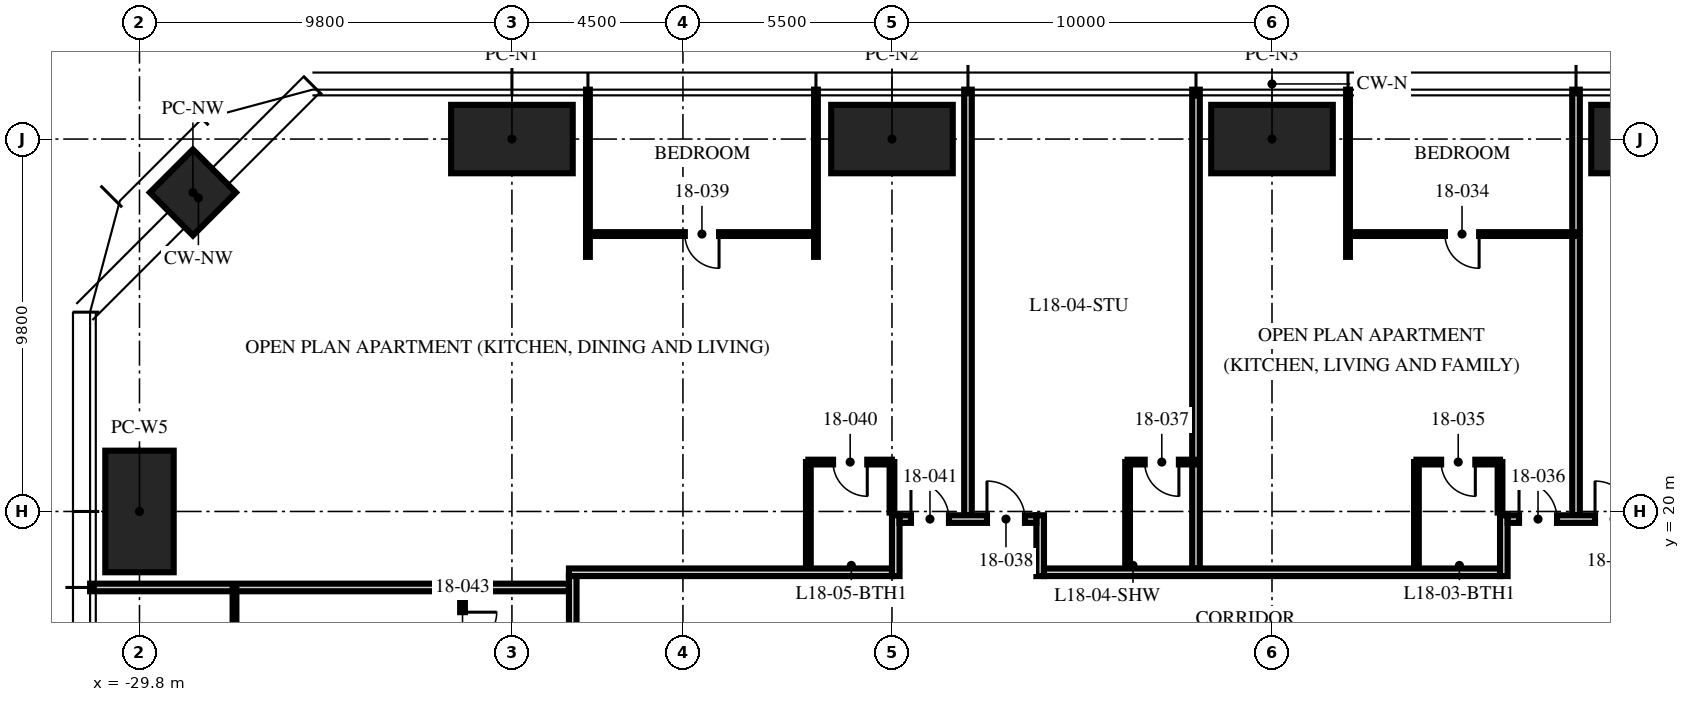
"""IFC4 building model, lengths in metres.
Left out: names, types, materials, properties, quantities, classifications, styles, units other than length and angle.
Written with IfcOpenShell. Run it as: python <this file> out.ifc"""

import sys

from ifc_helpers import new_model, si_unit, direction, frame, frame_2d, origin, origin_2d, place, context, subcontext, project, spatial, rectangle, hollow_rectangle, extrude, element, fill, save


model = new_model("IFC4")
c1 = context("Model", 3, precision=1e-05, world=origin(), true_north=direction((0.0, 1.0)))
c2 = subcontext(c1, "Body", "Model", "MODEL_VIEW")
j1 = project(units=[si_unit("LENGTHUNIT", "METRE"), si_unit("PLANEANGLEUNIT", "RADIAN")], contexts=[c1])
p1 = place(None, origin())
s1 = spatial("IfcSite", under=j1, at=p1, CompositionType="ELEMENT")
p2 = place(p1, origin())
s2 = spatial("IfcBuilding", under=s1, at=p2, CompositionType="ELEMENT")
p3 = place(p2, frame((0.0, 0.0, 73.5)))
s3 = spatial("IfcBuildingStorey", under=s2, at=p3, CompositionType="ELEMENT", Elevation=73.5)
for number, where, z_axis, x_axis in (
    (1, (-20.0, 29.8, 0.0), (0.0, 0.0, 1.0), (1.0, 0.0, 0.0)),
    (2, (-10.0, 29.8, 0.0), (0.0, 0.0, 1.0), (1.0, 0.0, 0.0)),
    (3, (0.0, 29.8, 0.0), (0.0, 0.0, 1.0), (1.0, 0.0, 0.0)),
    (4, (10.0, 29.8, 0.0), (0.0, 0.0, 1.0), (1.0, 0.0, 0.0)),
    (5, (-29.8, 20.0, 0.0), (0.0, 0.0, 1.0), (0.0, 1.0, 0.0)),
):
    element("IfcColumn", number, at=place(p3, frame(where, z_axis=z_axis, x_axis=x_axis)), inside=s3, PredefinedType="COLUMN", context=c2, shape_type="SweptSolid", body=[
        extrude(hollow_rectangle(XDim=3.2, YDim=1.8, WallThickness=0.2, at=origin_2d()), origin(), (0.0, 0.0, 1.0), 3.75),
    ])
p4 = place(p3, frame((-28.394, 28.394, 0.0), z_axis=(0.0, 0.0, 1.0), x_axis=(0.707106781187, 0.707106781187, 0.0)))
e6 = element("IfcColumn", 6, at=p4, inside=s3, PredefinedType="COLUMN", context=c2, shape_type="SweptSolid", body=[
    extrude(hollow_rectangle(XDim=1.6, YDim=1.6, WallThickness=0.1, at=origin_2d()), origin(), (0.0, 0.0, 1.0), 3.75),
])
p5 = place(p3, frame((8.0, 19.9, 0.0), z_axis=(0.0, 0.0, 1.0), x_axis=(0.0, 1.0, 0.0)))
e7 = element("IfcWall", 7, at=p5, inside=s3, PredefinedType="PARTITIONING", context=c2, shape_type="SweptSolid", body=[
    extrude(rectangle(XDim=11.2, YDim=0.2, at=frame_2d((5.6, 0.0))), origin(), (0.0, 0.0, 1.0), 2.71),
])
p6 = place(p3, frame((2.0, 26.7, 0.0), z_axis=(0.0, 0.0, 1.0), x_axis=(0.0, 1.0, 0.0)))
e8 = element("IfcWall", 8, at=p6, inside=s3, PredefinedType="PARTITIONING", context=c2, shape_type="SweptSolid", body=[
    extrude(rectangle(XDim=4.4, YDim=0.1, at=frame_2d((2.2, 0.0))), origin(), (0.0, 0.0, 1.0), 2.71),
])
p7 = place(p3, frame((-2.0, 18.5, 0.0), z_axis=(0.0, 0.0, 1.0), x_axis=(0.0, 1.0, 0.0)))
e9 = element("IfcWall", 9, at=p7, inside=s3, PredefinedType="PARTITIONING", context=c2, shape_type="SweptSolid", body=[
    extrude(rectangle(XDim=12.6, YDim=0.2, at=frame_2d((6.3, 0.0))), origin(), (0.0, 0.0, 1.0), 2.71),
])
p8 = place(p3, frame((-8.0, 19.9, 0.0), z_axis=(0.0, 0.0, 1.0), x_axis=(0.0, 1.0, 0.0)))
e10 = element("IfcWall", 10, at=p8, inside=s3, PredefinedType="PARTITIONING", context=c2, shape_type="SweptSolid", body=[
    extrude(rectangle(XDim=11.2, YDim=0.2, at=frame_2d((5.6, 0.0))), origin(), (0.0, 0.0, 1.0), 2.71),
])
for number, where, z_axis, x_axis in (
    (11, (-12.0, 26.7, 0.0), (0.0, 0.0, 1.0), (0.0, 1.0, 0.0)),
    (12, (-18.0, 26.7, 0.0), (0.0, 0.0, 1.0), (0.0, 1.0, 0.0)),
):
    element("IfcWall", number, at=place(p3, frame(where, z_axis=z_axis, x_axis=x_axis)), inside=s3, PredefinedType="PARTITIONING", context=c2, shape_type="SweptSolid", body=[
        extrude(rectangle(XDim=4.4, YDim=0.1, at=frame_2d((2.2, 0.0))), origin(), (0.0, 0.0, 1.0), 2.71),
    ])
p9 = place(p3, frame((-18.5, 18.0, 0.0), z_axis=(0.0, 0.0, 1.0), x_axis=(-1.0, 0.0, 0.0)))
e13 = element("IfcWall", 13, at=p9, inside=s3, PredefinedType="PARTITIONING", context=c2, shape_type="SweptSolid", body=[
    extrude(rectangle(XDim=12.6, YDim=0.2, at=frame_2d((6.3, 0.0))), origin(), (0.0, 0.0, 1.0), 2.3),
])
p10 = place(p3, frame((8.0, 27.3, 0.0), z_axis=(0.0, 0.0, 1.0), x_axis=(-1.0, 0.0, 0.0)))
e14 = element("IfcWall", 14, at=p10, inside=s3, PredefinedType="PARTITIONING", context=c2, shape_type="SweptSolid", body=[
    extrude(rectangle(XDim=6.0, YDim=0.1, at=frame_2d((3.0, 0.0))), origin(), (0.0, 0.0, 1.0), 2.61),
])
p11 = place(p10, frame((2.55, 0.0, 0.0)))
e15 = element("IfcOpeningElement", 15, at=p11, cuts=e14, PredefinedType="OPENING", context=c2, shape_type="SweptSolid", body=[
    extrude(rectangle(XDim=0.9, YDim=2.1, at=frame_2d((0.45, 1.05))), frame((0.0, 0.06, 0.0), z_axis=(0.0, -1.0, 0.0), x_axis=(1.0, 0.0, 0.0)), (0.0, 0.0, 1.0), 0.12),
])
p12 = place(p3, frame((6.0, 21.3, 0.0), z_axis=(0.0, 0.0, 1.0), x_axis=(-1.0, 0.0, 0.0)))
e16 = element("IfcWall", 16, at=p12, inside=s3, PredefinedType="PARTITIONING", context=c2, shape_type="SweptSolid", body=[
    extrude(rectangle(XDim=2.2, YDim=0.125, at=frame_2d((1.1, 0.0))), origin(), (0.0, 0.0, 1.0), 2.61),
])
p13 = place(p12, frame((0.65, 0.0, 0.0)))
e17 = element("IfcOpeningElement", 17, at=p13, cuts=e16, PredefinedType="OPENING", context=c2, shape_type="SweptSolid", body=[
    extrude(rectangle(XDim=0.9, YDim=2.1, at=frame_2d((0.45, 1.05))), frame((0.0, 0.073, 0.0), z_axis=(0.0, -1.0, 0.0), x_axis=(1.0, 0.0, 0.0)), (0.0, 0.0, 1.0), 0.145),
])
p14 = place(p3, frame((6.0, 19.97, 0.0), z_axis=(0.0, 0.0, 1.0), x_axis=(0.0, 1.0, 0.0)))
e18 = element("IfcWall", 18, at=p14, inside=s3, PredefinedType="PARTITIONING", context=c2, shape_type="SweptSolid", body=[
    extrude(rectangle(XDim=1.33, YDim=0.125, at=frame_2d((0.665, 0.0))), origin(), (0.0, 0.0, 1.0), 3.5),
])
p15 = place(p3, frame((3.8, 18.5, 0.0), z_axis=(0.0, 0.0, 1.0), x_axis=(0.0, 1.0, 0.0)))
e19 = element("IfcWall", 19, at=p15, inside=s3, PredefinedType="PARTITIONING", context=c2, shape_type="SweptSolid", body=[
    extrude(rectangle(XDim=2.8, YDim=0.125, at=frame_2d((1.4, 0.0))), origin(), (0.0, 0.0, 1.0), 3.5),
])
p16 = place(p3, frame((-2.0, 21.3, 0.0), z_axis=(0.0, 0.0, 1.0), x_axis=(-1.0, 0.0, 0.0)))
e20 = element("IfcWall", 20, at=p16, inside=s3, PredefinedType="PARTITIONING", context=c2, shape_type="SweptSolid", body=[
    extrude(rectangle(XDim=1.8, YDim=0.125, at=frame_2d((0.9, 0.0))), origin(), (0.0, 0.0, 1.0), 3.5),
])
p17 = place(p16, frame((0.45, 0.0, 0.0)))
e21 = element("IfcOpeningElement", 21, at=p17, cuts=e20, PredefinedType="OPENING", context=c2, shape_type="SweptSolid", body=[
    extrude(rectangle(XDim=0.9, YDim=2.1, at=frame_2d((0.45, 1.05))), frame((0.0, 0.073, 0.0), z_axis=(0.0, -1.0, 0.0), x_axis=(1.0, 0.0, 0.0)), (0.0, 0.0, 1.0), 0.145),
])
p18 = place(p3, frame((-3.8, 18.5, 0.0), z_axis=(0.0, 0.0, 1.0), x_axis=(0.0, 1.0, 0.0)))
e22 = element("IfcWall", 22, at=p18, inside=s3, PredefinedType="PARTITIONING", context=c2, shape_type="SweptSolid", body=[
    extrude(rectangle(XDim=2.8, YDim=0.125, at=frame_2d((1.4, 0.0))), origin(), (0.0, 0.0, 1.0), 3.5),
])
p19 = place(p3, frame((-12.0, 27.3, 0.0), z_axis=(0.0, 0.0, 1.0), x_axis=(-1.0, 0.0, 0.0)))
e23 = element("IfcWall", 23, at=p19, inside=s3, PredefinedType="PARTITIONING", context=c2, shape_type="SweptSolid", body=[
    extrude(rectangle(XDim=6.0, YDim=0.1, at=frame_2d((3.0, 0.0))), origin(), (0.0, 0.0, 1.0), 2.61),
])
p20 = place(p19, frame((2.55, 0.0, 0.0)))
e24 = element("IfcOpeningElement", 24, at=p20, cuts=e23, PredefinedType="OPENING", context=c2, shape_type="SweptSolid", body=[
    extrude(rectangle(XDim=0.9, YDim=2.1, at=frame_2d((0.45, 1.05))), frame((0.0, 0.06, 0.0), z_axis=(0.0, -1.0, 0.0), x_axis=(1.0, 0.0, 0.0)), (0.0, 0.0, 1.0), 0.12),
])
p21 = place(p3, frame((-10.0, 21.3, 0.0), z_axis=(0.0, 0.0, 1.0), x_axis=(-1.0, 0.0, 0.0)))
e25 = element("IfcWall", 25, at=p21, inside=s3, PredefinedType="PARTITIONING", context=c2, shape_type="SweptSolid", body=[
    extrude(rectangle(XDim=2.2, YDim=0.125, at=frame_2d((1.1, 0.0))), origin(), (0.0, 0.0, 1.0), 2.492),
])
p22 = place(p21, frame((0.65, 0.0, 0.0)))
e26 = element("IfcOpeningElement", 26, at=p22, cuts=e25, PredefinedType="OPENING", context=c2, shape_type="SweptSolid", body=[
    extrude(rectangle(XDim=0.9, YDim=2.1, at=frame_2d((0.45, 1.05))), frame((0.0, 0.073, 0.0), z_axis=(0.0, -1.0, 0.0), x_axis=(1.0, 0.0, 0.0)), (0.0, 0.0, 1.0), 0.145),
])
p23 = place(p3, frame((-10.0, 19.97, 0.0), z_axis=(0.0, 0.0, 1.0), x_axis=(0.0, 1.0, 0.0)))
e27 = element("IfcWall", 27, at=p23, inside=s3, PredefinedType="PARTITIONING", context=c2, shape_type="SweptSolid", body=[
    extrude(rectangle(XDim=1.33, YDim=0.125, at=frame_2d((0.665, 0.0))), origin(), (0.0, 0.0, 1.0), 2.492),
])
p24 = place(p3, frame((-12.2, 18.5, 0.0), z_axis=(0.0, 0.0, 1.0), x_axis=(0.0, 1.0, 0.0)))
e28 = element("IfcWall", 28, at=p24, inside=s3, PredefinedType="PARTITIONING", context=c2, shape_type="SweptSolid", body=[
    extrude(rectangle(XDim=2.8, YDim=0.125, at=frame_2d((1.4, 0.0))), origin(), (0.0, 0.0, 1.0), 3.5),
])
p25 = place(p3, frame((-27.3, 18.0, 0.0), z_axis=(0.0, 0.0, 1.0), x_axis=(0.0, -1.0, 0.0)))
e29 = element("IfcWall", 29, at=p25, inside=s3, PredefinedType="PARTITIONING", context=c2, shape_type="SweptSolid", body=[
    extrude(rectangle(XDim=6.0, YDim=0.1, at=frame_2d((3.0, 0.0))), origin(), (0.0, 0.0, 1.0), 2.61),
])
p26 = place(p25, frame((2.55, 0.0, 0.0)))
e30 = element("IfcOpeningElement", 30, at=p26, cuts=e29, PredefinedType="OPENING", context=c2, shape_type="SweptSolid", body=[
    extrude(rectangle(XDim=0.9, YDim=2.1, at=frame_2d((0.45, 1.05))), frame((0.0, 0.06, 0.0), z_axis=(0.0, -1.0, 0.0), x_axis=(1.0, 0.0, 0.0)), (0.0, 0.0, 1.0), 0.12),
])
p27 = place(p3, frame((-21.3, 18.0, 0.0), z_axis=(0.0, 0.0, 1.0), x_axis=(0.0, -1.0, 0.0)))
e31 = element("IfcWall", 31, at=p27, inside=s3, PredefinedType="PARTITIONING", context=c2, shape_type="SweptSolid", body=[
    extrude(rectangle(XDim=2.2, YDim=0.125, at=frame_2d((1.1, 0.0))), origin(), (0.0, 0.0, 1.0), 3.5),
])
p28 = place(p27, frame((0.65, 0.0, 0.0)))
e32 = element("IfcOpeningElement", 32, at=p28, cuts=e31, PredefinedType="OPENING", context=c2, shape_type="SweptSolid", body=[
    extrude(rectangle(XDim=0.9, YDim=2.1, at=frame_2d((0.45, 1.05))), frame((0.0, 0.073, 0.0), z_axis=(0.0, -1.0, 0.0), x_axis=(1.0, 0.0, 0.0)), (0.0, 0.0, 1.0), 0.145),
])
p29 = place(p3, frame((-18.5, 18.4, 0.0), z_axis=(0.0, 0.0, 1.0), x_axis=(1.0, 0.0, 0.0)))
e33 = element("IfcWall", 33, at=p29, inside=s3, PredefinedType="PARTITIONING", context=c2, shape_type="SweptSolid", body=[
    extrude(rectangle(XDim=8.5, YDim=0.2, at=frame_2d((4.25, 0.0))), origin(), (0.0, 0.0, 1.0), 2.3),
])
p30 = place(p3, frame((-9.9, 18.3, 0.0), z_axis=(0.0, 0.0, 1.0), x_axis=(0.0, 1.0, 0.0)))
e34 = element("IfcWall", 34, at=p30, inside=s3, PredefinedType="PARTITIONING", context=c2, shape_type="SweptSolid", body=[
    extrude(rectangle(XDim=1.6, YDim=0.2, at=frame_2d((0.8, 0.0))), origin(), (0.0, 0.0, 1.0), 2.492),
])
p31 = place(p3, frame((-6.1, 18.3, 0.0), z_axis=(0.0, 0.0, 1.0), x_axis=(0.0, 1.0, 0.0)))
e35 = element("IfcWall", 35, at=p31, inside=s3, PredefinedType="PARTITIONING", context=c2, shape_type="SweptSolid", body=[
    extrude(rectangle(XDim=1.6, YDim=0.2, at=frame_2d((0.8, 0.0))), origin(), (0.0, 0.0, 1.0), 3.5),
])
p32 = place(p3, frame((-9.8, 19.8, 0.0), z_axis=(0.0, 0.0, 1.0), x_axis=(1.0, 0.0, 0.0)))
e36 = element("IfcWall", 36, at=p32, inside=s3, PredefinedType="PARTITIONING", context=c2, shape_type="SweptSolid", body=[
    extrude(rectangle(XDim=3.6, YDim=0.2, at=frame_2d((1.8, 0.0))), origin(), (0.0, 0.0, 1.0), 3.5),
])
p33 = place(p32, frame((2.3, 0.0, 0.0)))
e37 = element("IfcOpeningElement", 37, at=p33, cuts=e36, PredefinedType="OPENING", context=c2, shape_type="SweptSolid", body=[
    extrude(rectangle(XDim=1.0, YDim=2.2, at=frame_2d((0.5, 1.1))), frame((0.0, 0.11, 0.0), z_axis=(0.0, -1.0, 0.0), x_axis=(1.0, 0.0, 0.0)), (0.0, 0.0, 1.0), 0.22),
])
p34 = place(p32, frame((0.3, 0.0, 0.0)))
e38 = element("IfcOpeningElement", 38, at=p34, cuts=e36, PredefinedType="OPENING", context=c2, shape_type="SweptSolid", body=[
    extrude(rectangle(XDim=1.0, YDim=2.2, at=frame_2d((0.5, 1.1))), frame((0.0, 0.11, 0.0), z_axis=(0.0, -1.0, 0.0), x_axis=(1.0, 0.0, 0.0)), (0.0, 0.0, 1.0), 0.22),
])
p35 = place(p3, frame((-6.0, 18.4, 0.0), z_axis=(0.0, 0.0, 1.0), x_axis=(1.0, 0.0, 0.0)))
e39 = element("IfcWall", 39, at=p35, inside=s3, PredefinedType="PARTITIONING", context=c2, shape_type="SweptSolid", body=[
    extrude(rectangle(XDim=12.0, YDim=0.2, at=frame_2d((6.0, 0.0))), origin(), (0.0, 0.0, 1.0), 2.492),
])
p36 = place(p3, frame((6.1, 18.3, 0.0), z_axis=(0.0, 0.0, 1.0), x_axis=(0.0, 1.0, 0.0)))
e40 = element("IfcWall", 40, at=p36, inside=s3, PredefinedType="PARTITIONING", context=c2, shape_type="SweptSolid", body=[
    extrude(rectangle(XDim=1.6, YDim=0.2, at=frame_2d((0.8, 0.0))), origin(), (0.0, 0.0, 1.0), 3.5),
])
p37 = place(p3, frame((6.2, 19.8, 0.0), z_axis=(0.0, 0.0, 1.0), x_axis=(1.0, 0.0, 0.0)))
e41 = element("IfcWall", 41, at=p37, inside=s3, PredefinedType="PARTITIONING", context=c2, shape_type="SweptSolid", body=[
    extrude(rectangle(XDim=3.6, YDim=0.2, at=frame_2d((1.8, 0.0))), origin(), (0.0, 0.0, 1.0), 3.5),
])
p38 = place(p37, frame((2.3, 0.0, 0.0)))
e42 = element("IfcOpeningElement", 42, at=p38, cuts=e41, PredefinedType="OPENING", context=c2, shape_type="SweptSolid", body=[
    extrude(rectangle(XDim=1.0, YDim=2.2, at=frame_2d((0.5, 1.1))), frame((0.0, 0.11, 0.0), z_axis=(0.0, -1.0, 0.0), x_axis=(1.0, 0.0, 0.0)), (0.0, 0.0, 1.0), 0.22),
])
p39 = place(p37, frame((0.3, 0.0, 0.0)))
e43 = element("IfcOpeningElement", 43, at=p39, cuts=e41, PredefinedType="OPENING", context=c2, shape_type="SweptSolid", body=[
    extrude(rectangle(XDim=1.0, YDim=2.2, at=frame_2d((0.5, 1.1))), frame((0.0, 0.11, 0.0), z_axis=(0.0, -1.0, 0.0), x_axis=(1.0, 0.0, 0.0)), (0.0, 0.0, 1.0), 0.22),
])
p40 = place(p3, frame((-18.4, 18.3, 0.0), z_axis=(0.0, 0.0, 1.0), x_axis=(0.0, -1.0, 0.0)))
e44 = element("IfcWall", 44, at=p40, inside=s3, PredefinedType="PARTITIONING", context=c2, shape_type="SweptSolid", body=[
    extrude(rectangle(XDim=8.3, YDim=0.2, at=frame_2d((4.15, 0.0))), origin(), (0.0, 0.0, 1.0), 2.3),
])
p41 = place(p38, origin())
e45 = element("IfcDoor", 45, at=p41, inside=s3, OperationType="SINGLE_SWING_LEFT", PredefinedType="DOOR", context=c2, shape_type="SweptSolid", body=[
    extrude(rectangle(XDim=1.0, YDim=2.2, at=frame_2d((0.5, 1.1))), frame((0.0, 0.025, 0.0), z_axis=(0.0, -1.0, 0.0), x_axis=(1.0, 0.0, 0.0)), (0.0, 0.0, 1.0), 0.05),
])
fill(e42, e45)
p42 = place(p11, origin())
e46 = element("IfcDoor", 46, at=p42, inside=s3, OperationType="SINGLE_SWING_LEFT", PredefinedType="DOOR", context=c2, shape_type="SweptSolid", body=[
    extrude(rectangle(XDim=0.9, YDim=2.1, at=frame_2d((0.45, 1.05))), frame((0.0, 0.025, 0.0), z_axis=(0.0, -1.0, 0.0), x_axis=(1.0, 0.0, 0.0)), (0.0, 0.0, 1.0), 0.05),
])
fill(e15, e46)
p43 = place(p13, origin())
e47 = element("IfcDoor", 47, at=p43, inside=s3, OperationType="SINGLE_SWING_LEFT", PredefinedType="DOOR", context=c2, shape_type="SweptSolid", body=[
    extrude(rectangle(XDim=0.9, YDim=2.1, at=frame_2d((0.45, 1.05))), frame((0.0, 0.025, 0.0), z_axis=(0.0, -1.0, 0.0), x_axis=(1.0, 0.0, 0.0)), (0.0, 0.0, 1.0), 0.05),
])
fill(e17, e47)
p44 = place(p39, origin())
e48 = element("IfcDoor", 48, at=p44, inside=s3, OperationType="SINGLE_SWING_LEFT", PredefinedType="DOOR", context=c2, shape_type="SweptSolid", body=[
    extrude(rectangle(XDim=1.0, YDim=2.2, at=frame_2d((0.5, 1.1))), frame((0.0, 0.025, 0.0), z_axis=(0.0, -1.0, 0.0), x_axis=(1.0, 0.0, 0.0)), (0.0, 0.0, 1.0), 0.05),
])
fill(e43, e48)
p45 = place(p17, origin())
e49 = element("IfcDoor", 49, at=p45, inside=s3, OperationType="SINGLE_SWING_LEFT", PredefinedType="DOOR", context=c2, shape_type="SweptSolid", body=[
    extrude(rectangle(XDim=0.9, YDim=2.1, at=frame_2d((0.45, 1.05))), frame((0.0, 0.025, 0.0), z_axis=(0.0, -1.0, 0.0), x_axis=(1.0, 0.0, 0.0)), (0.0, 0.0, 1.0), 0.05),
])
fill(e21, e49)
p46 = place(p33, origin())
e50 = element("IfcDoor", 50, at=p46, inside=s3, OperationType="SINGLE_SWING_LEFT", PredefinedType="DOOR", context=c2, shape_type="SweptSolid", body=[
    extrude(rectangle(XDim=1.0, YDim=2.2, at=frame_2d((0.5, 1.1))), frame((0.0, 0.025, 0.0), z_axis=(0.0, -1.0, 0.0), x_axis=(1.0, 0.0, 0.0)), (0.0, 0.0, 1.0), 0.05),
])
fill(e37, e50)
p47 = place(p20, origin())
e51 = element("IfcDoor", 51, at=p47, inside=s3, OperationType="SINGLE_SWING_LEFT", PredefinedType="DOOR", context=c2, shape_type="SweptSolid", body=[
    extrude(rectangle(XDim=0.9, YDim=2.1, at=frame_2d((0.45, 1.05))), frame((0.0, 0.025, 0.0), z_axis=(0.0, -1.0, 0.0), x_axis=(1.0, 0.0, 0.0)), (0.0, 0.0, 1.0), 0.05),
])
fill(e24, e51)
p48 = place(p22, origin())
e52 = element("IfcDoor", 52, at=p48, inside=s3, OperationType="SINGLE_SWING_LEFT", PredefinedType="DOOR", context=c2, shape_type="SweptSolid", body=[
    extrude(rectangle(XDim=0.9, YDim=2.1, at=frame_2d((0.45, 1.05))), frame((0.0, 0.025, 0.0), z_axis=(0.0, -1.0, 0.0), x_axis=(1.0, 0.0, 0.0)), (0.0, 0.0, 1.0), 0.05),
])
fill(e26, e52)
p49 = place(p34, origin())
e53 = element("IfcDoor", 53, at=p49, inside=s3, OperationType="SINGLE_SWING_LEFT", PredefinedType="DOOR", context=c2, shape_type="SweptSolid", body=[
    extrude(rectangle(XDim=1.0, YDim=2.2, at=frame_2d((0.5, 1.1))), frame((0.0, 0.025, 0.0), z_axis=(0.0, -1.0, 0.0), x_axis=(1.0, 0.0, 0.0)), (0.0, 0.0, 1.0), 0.05),
])
fill(e38, e53)
p50 = place(p28, origin())
e54 = element("IfcDoor", 54, at=p50, inside=s3, OperationType="SINGLE_SWING_LEFT", PredefinedType="DOOR", context=c2, shape_type="SweptSolid", body=[
    extrude(rectangle(XDim=0.9, YDim=2.1, at=frame_2d((0.45, 1.05))), frame((0.0, 0.025, 0.0), z_axis=(0.0, -1.0, 0.0), x_axis=(1.0, 0.0, 0.0)), (0.0, 0.0, 1.0), 0.05),
])
fill(e32, e54)
save(model, sys.argv[1])
